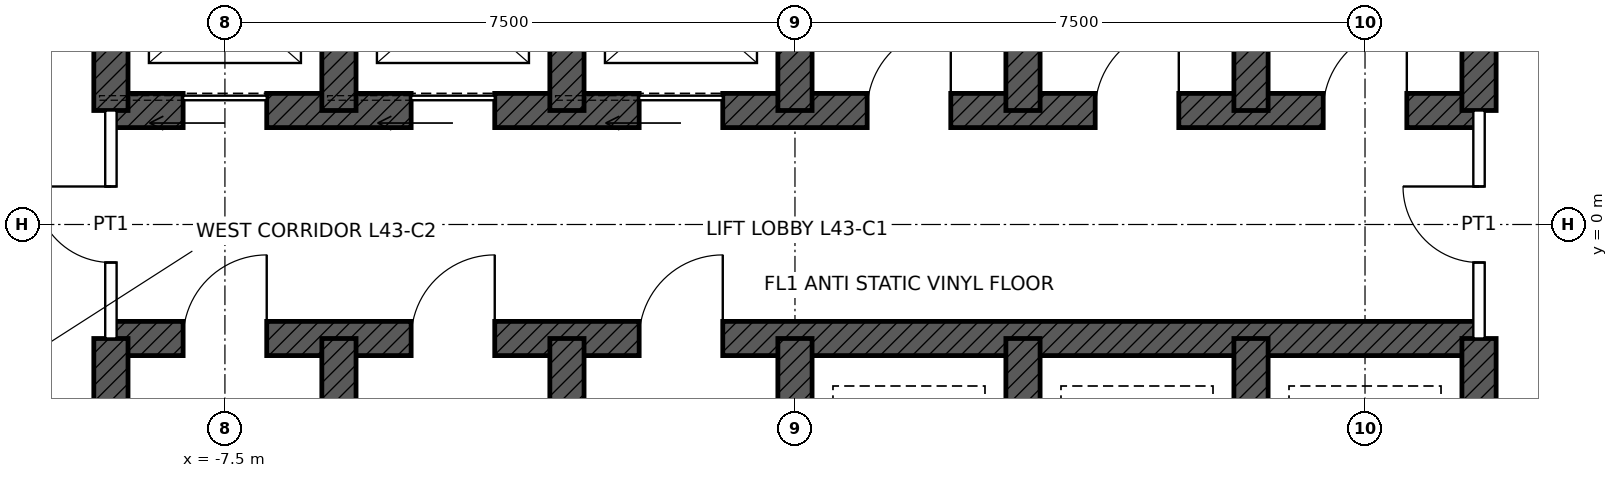
"""IFC4 building model, lengths in metres.
Left out: names, types, materials, properties, quantities, classifications, styles, units other than length and angle.
Written with IfcOpenShell. Run it as: python <this file> out.ifc"""

import sys

from ifc_helpers import new_model, si_unit, direction, frame, frame_2d, origin, place, context, subcontext, project, spatial, rectangle, extrude, element, fill, save


model = new_model("IFC4")
c1 = context("Model", 3, precision=1e-05, world=origin(), true_north=direction((0.0, 1.0)))
c2 = subcontext(c1, "Body", "Model", "MODEL_VIEW")
j1 = project(units=[si_unit("LENGTHUNIT", "METRE"), si_unit("PLANEANGLEUNIT", "RADIAN")], contexts=[c1])
p1 = place(None, origin())
s1 = spatial("IfcSite", under=j1, at=p1, CompositionType="ELEMENT")
p2 = place(p1, origin())
s2 = spatial("IfcBuilding", under=s1, at=p2, CompositionType="ELEMENT")
p3 = place(p2, frame((0.0, 0.0, 205.9)))
s3 = spatial("IfcBuildingStorey", under=s2, at=p3, CompositionType="ELEMENT", Elevation=205.9)
p4 = place(p3, frame((-9.0, 1.5, 0.0), z_axis=(0.0, 0.0, 1.0), x_axis=(1.0, 0.0, 0.0)))
e1 = element("IfcWall", 1, at=p4, inside=s3, PredefinedType="SHEAR", context=c2, shape_type="SweptSolid", body=[
    extrude(rectangle(XDim=18.0, YDim=0.45, at=frame_2d((9.0, 0.0))), origin(), (0.0, 0.0, 1.0), 4.0),
])
p5 = place(p4, frame((0.95, 0.0, 0.0)))
e2 = element("IfcOpeningElement", 2, at=p5, cuts=e1, PredefinedType="OPENING", context=c2, shape_type="SweptSolid", body=[
    extrude(rectangle(XDim=1.1, YDim=2.1, at=frame_2d((0.55, 1.05))), frame((0.0, 0.235, 0.0), z_axis=(0.0, -1.0, 0.0), x_axis=(1.0, 0.0, 0.0)), (0.0, 0.0, 1.0), 0.47),
])
p6 = place(p4, frame((3.95, 0.0, 0.0)))
e3 = element("IfcOpeningElement", 3, at=p6, cuts=e1, PredefinedType="OPENING", context=c2, shape_type="SweptSolid", body=[
    extrude(rectangle(XDim=1.1, YDim=2.1, at=frame_2d((0.55, 1.05))), frame((0.0, 0.235, 0.0), z_axis=(0.0, -1.0, 0.0), x_axis=(1.0, 0.0, 0.0)), (0.0, 0.0, 1.0), 0.47),
])
p7 = place(p4, frame((6.95, 0.0, 0.0)))
e4 = element("IfcOpeningElement", 4, at=p7, cuts=e1, PredefinedType="OPENING", context=c2, shape_type="SweptSolid", body=[
    extrude(rectangle(XDim=1.1, YDim=2.1, at=frame_2d((0.55, 1.05))), frame((0.0, 0.235, 0.0), z_axis=(0.0, -1.0, 0.0), x_axis=(1.0, 0.0, 0.0)), (0.0, 0.0, 1.0), 0.47),
])
p8 = place(p4, frame((9.95, 0.0, 0.0)))
e5 = element("IfcOpeningElement", 5, at=p8, cuts=e1, PredefinedType="OPENING", context=c2, shape_type="SweptSolid", body=[
    extrude(rectangle(XDim=1.1, YDim=2.1, at=frame_2d((0.55, 1.05))), frame((0.0, 0.235, 0.0), z_axis=(0.0, -1.0, 0.0), x_axis=(1.0, 0.0, 0.0)), (0.0, 0.0, 1.0), 0.47),
])
p9 = place(p4, frame((12.95, 0.0, 0.0)))
e6 = element("IfcOpeningElement", 6, at=p9, cuts=e1, PredefinedType="OPENING", context=c2, shape_type="SweptSolid", body=[
    extrude(rectangle(XDim=1.1, YDim=2.1, at=frame_2d((0.55, 1.05))), frame((0.0, 0.235, 0.0), z_axis=(0.0, -1.0, 0.0), x_axis=(1.0, 0.0, 0.0)), (0.0, 0.0, 1.0), 0.47),
])
p10 = place(p4, frame((15.95, 0.0, 0.0)))
e7 = element("IfcOpeningElement", 7, at=p10, cuts=e1, PredefinedType="OPENING", context=c2, shape_type="SweptSolid", body=[
    extrude(rectangle(XDim=1.1, YDim=2.1, at=frame_2d((0.55, 1.05))), frame((0.0, 0.235, 0.0), z_axis=(0.0, -1.0, 0.0), x_axis=(1.0, 0.0, 0.0)), (0.0, 0.0, 1.0), 0.47),
])
p11 = place(p3, frame((-9.0, -1.5, 0.0), z_axis=(0.0, 0.0, 1.0), x_axis=(1.0, 0.0, 0.0)))
e8 = element("IfcWall", 8, at=p11, inside=s3, PredefinedType="SHEAR", context=c2, shape_type="SweptSolid", body=[
    extrude(rectangle(XDim=18.0, YDim=0.45, at=frame_2d((9.0, 0.0))), origin(), (0.0, 0.0, 1.0), 4.0),
])
p12 = place(p11, frame((0.95, 0.0, 0.0)))
e9 = element("IfcOpeningElement", 9, at=p12, cuts=e8, PredefinedType="OPENING", context=c2, shape_type="SweptSolid", body=[
    extrude(rectangle(XDim=1.1, YDim=2.1, at=frame_2d((0.55, 1.05))), frame((0.0, 0.235, 0.0), z_axis=(0.0, -1.0, 0.0), x_axis=(1.0, 0.0, 0.0)), (0.0, 0.0, 1.0), 0.47),
])
p13 = place(p11, frame((3.95, 0.0, 0.0)))
e10 = element("IfcOpeningElement", 10, at=p13, cuts=e8, PredefinedType="OPENING", context=c2, shape_type="SweptSolid", body=[
    extrude(rectangle(XDim=1.1, YDim=2.1, at=frame_2d((0.55, 1.05))), frame((0.0, 0.235, 0.0), z_axis=(0.0, -1.0, 0.0), x_axis=(1.0, 0.0, 0.0)), (0.0, 0.0, 1.0), 0.47),
])
p14 = place(p11, frame((6.95, 0.0, 0.0)))
e11 = element("IfcOpeningElement", 11, at=p14, cuts=e8, PredefinedType="OPENING", context=c2, shape_type="SweptSolid", body=[
    extrude(rectangle(XDim=1.1, YDim=2.1, at=frame_2d((0.55, 1.05))), frame((0.0, 0.235, 0.0), z_axis=(0.0, -1.0, 0.0), x_axis=(1.0, 0.0, 0.0)), (0.0, 0.0, 1.0), 0.47),
])
for number, where, z_axis, x_axis in (
    (12, (-9.0, 1.5, 0.0), (0.0, 0.0, 1.0), (0.0, 1.0, 0.0)),
    (13, (9.0, 1.5, 0.0), (0.0, 0.0, 1.0), (0.0, 1.0, 0.0)),
    (14, (-9.0, -4.5, 0.0), (0.0, 0.0, 1.0), (0.0, 1.0, 0.0)),
    (15, (9.0, -4.5, 0.0), (0.0, 0.0, 1.0), (0.0, 1.0, 0.0)),
    (16, (-6.0, 1.5, 0.0), (0.0, 0.0, 1.0), (0.0, 1.0, 0.0)),
    (17, (-3.0, 1.5, 0.0), (0.0, 0.0, 1.0), (0.0, 1.0, 0.0)),
    (18, (0.0, 1.5, 0.0), (0.0, 0.0, 1.0), (0.0, 1.0, 0.0)),
    (19, (3.0, 1.5, 0.0), (0.0, 0.0, 1.0), (0.0, 1.0, 0.0)),
    (20, (6.0, 1.5, 0.0), (0.0, 0.0, 1.0), (0.0, 1.0, 0.0)),
    (21, (-6.0, -4.5, 0.0), (0.0, 0.0, 1.0), (0.0, 1.0, 0.0)),
    (22, (-3.0, -4.5, 0.0), (0.0, 0.0, 1.0), (0.0, 1.0, 0.0)),
    (23, (0.0, -4.5, 0.0), (0.0, 0.0, 1.0), (0.0, 1.0, 0.0)),
    (24, (3.0, -4.5, 0.0), (0.0, 0.0, 1.0), (0.0, 1.0, 0.0)),
    (25, (6.0, -4.5, 0.0), (0.0, 0.0, 1.0), (0.0, 1.0, 0.0)),
):
    element("IfcWall", number, at=place(p3, frame(where, z_axis=z_axis, x_axis=x_axis)), inside=s3, PredefinedType="SHEAR", context=c2, shape_type="SweptSolid", body=[
        extrude(rectangle(XDim=3.0, YDim=0.45, at=frame_2d((1.5, 0.0))), origin(), (0.0, 0.0, 1.0), 4.0),
    ])
p15 = place(p3, frame((-9.0, -1.5, 0.0), z_axis=(0.0, 0.0, 1.0), x_axis=(0.0, 1.0, 0.0)))
e26 = element("IfcWall", 26, at=p15, inside=s3, PredefinedType="PARTITIONING", context=c2, shape_type="SweptSolid", body=[
    extrude(rectangle(XDim=3.0, YDim=0.15, at=frame_2d((1.5, 0.0))), origin(), (0.0, 0.0, 1.0), 3.75),
])
p16 = place(p15, frame((1.0, 0.0, 0.0)))
e27 = element("IfcOpeningElement", 27, at=p16, cuts=e26, PredefinedType="OPENING", context=c2, shape_type="SweptSolid", body=[
    extrude(rectangle(XDim=1.0, YDim=2.4, at=frame_2d((0.5, 1.2))), frame((0.0, 0.085, 0.0), z_axis=(0.0, -1.0, 0.0), x_axis=(1.0, 0.0, 0.0)), (0.0, 0.0, 1.0), 0.17),
])
p17 = place(p3, frame((9.0, -1.5, 0.0), z_axis=(0.0, 0.0, 1.0), x_axis=(0.0, 1.0, 0.0)))
e28 = element("IfcWall", 28, at=p17, inside=s3, PredefinedType="PARTITIONING", context=c2, shape_type="SweptSolid", body=[
    extrude(rectangle(XDim=3.0, YDim=0.15, at=frame_2d((1.5, 0.0))), origin(), (0.0, 0.0, 1.0), 3.75),
])
p18 = place(p17, frame((1.0, 0.0, 0.0)))
e29 = element("IfcOpeningElement", 29, at=p18, cuts=e28, PredefinedType="OPENING", context=c2, shape_type="SweptSolid", body=[
    extrude(rectangle(XDim=1.0, YDim=2.4, at=frame_2d((0.5, 1.2))), frame((0.0, 0.085, 0.0), z_axis=(0.0, -1.0, 0.0), x_axis=(1.0, 0.0, 0.0)), (0.0, 0.0, 1.0), 0.17),
])
p19 = place(p5, origin())
e30 = element("IfcDoor", 30, at=p19, inside=s3, OperationType="SLIDING_TO_LEFT", PredefinedType="DOOR", context=c2, shape_type="SweptSolid", body=[
    extrude(rectangle(XDim=1.1, YDim=2.1, at=frame_2d((0.55, 1.05))), frame((0.0, 0.025, 0.0), z_axis=(0.0, -1.0, 0.0), x_axis=(1.0, 0.0, 0.0)), (0.0, 0.0, 1.0), 0.05),
])
fill(e2, e30)
p20 = place(p6, origin())
e31 = element("IfcDoor", 31, at=p20, inside=s3, OperationType="SLIDING_TO_LEFT", PredefinedType="DOOR", context=c2, shape_type="SweptSolid", body=[
    extrude(rectangle(XDim=1.1, YDim=2.1, at=frame_2d((0.55, 1.05))), frame((0.0, 0.025, 0.0), z_axis=(0.0, -1.0, 0.0), x_axis=(1.0, 0.0, 0.0)), (0.0, 0.0, 1.0), 0.05),
])
fill(e3, e31)
p21 = place(p7, origin())
e32 = element("IfcDoor", 32, at=p21, inside=s3, OperationType="SLIDING_TO_LEFT", PredefinedType="DOOR", context=c2, shape_type="SweptSolid", body=[
    extrude(rectangle(XDim=1.1, YDim=2.1, at=frame_2d((0.55, 1.05))), frame((0.0, 0.025, 0.0), z_axis=(0.0, -1.0, 0.0), x_axis=(1.0, 0.0, 0.0)), (0.0, 0.0, 1.0), 0.05),
])
fill(e4, e32)
p22 = place(p16, origin())
e33 = element("IfcDoor", 33, at=p22, inside=s3, OperationType="SINGLE_SWING_RIGHT", PredefinedType="DOOR", context=c2, shape_type="SweptSolid", body=[
    extrude(rectangle(XDim=1.0, YDim=2.4, at=frame_2d((0.5, 1.2))), frame((0.0, 0.025, 0.0), z_axis=(0.0, -1.0, 0.0), x_axis=(1.0, 0.0, 0.0)), (0.0, 0.0, 1.0), 0.05),
])
fill(e27, e33)
p23 = place(p18, origin())
e34 = element("IfcDoor", 34, at=p23, inside=s3, OperationType="SINGLE_SWING_RIGHT", PredefinedType="DOOR", context=c2, shape_type="SweptSolid", body=[
    extrude(rectangle(XDim=1.0, YDim=2.4, at=frame_2d((0.5, 1.2))), frame((0.0, 0.025, 0.0), z_axis=(0.0, -1.0, 0.0), x_axis=(1.0, 0.0, 0.0)), (0.0, 0.0, 1.0), 0.05),
])
fill(e29, e34)
p24 = place(p8, origin())
e35 = element("IfcDoor", 35, at=p24, inside=s3, OperationType="SINGLE_SWING_RIGHT", PredefinedType="DOOR", context=c2, shape_type="SweptSolid", body=[
    extrude(rectangle(XDim=1.1, YDim=2.1, at=frame_2d((0.55, 1.05))), frame((0.0, 0.025, 0.0), z_axis=(0.0, -1.0, 0.0), x_axis=(1.0, 0.0, 0.0)), (0.0, 0.0, 1.0), 0.05),
])
fill(e5, e35)
p25 = place(p9, origin())
e36 = element("IfcDoor", 36, at=p25, inside=s3, OperationType="SINGLE_SWING_RIGHT", PredefinedType="DOOR", context=c2, shape_type="SweptSolid", body=[
    extrude(rectangle(XDim=1.1, YDim=2.1, at=frame_2d((0.55, 1.05))), frame((0.0, 0.025, 0.0), z_axis=(0.0, -1.0, 0.0), x_axis=(1.0, 0.0, 0.0)), (0.0, 0.0, 1.0), 0.05),
])
fill(e6, e36)
p26 = place(p10, origin())
e37 = element("IfcDoor", 37, at=p26, inside=s3, OperationType="SINGLE_SWING_RIGHT", PredefinedType="DOOR", context=c2, shape_type="SweptSolid", body=[
    extrude(rectangle(XDim=1.1, YDim=2.1, at=frame_2d((0.55, 1.05))), frame((0.0, 0.025, 0.0), z_axis=(0.0, -1.0, 0.0), x_axis=(1.0, 0.0, 0.0)), (0.0, 0.0, 1.0), 0.05),
])
fill(e7, e37)
p27 = place(p12, origin())
e38 = element("IfcDoor", 38, at=p27, inside=s3, OperationType="SINGLE_SWING_RIGHT", PredefinedType="DOOR", context=c2, shape_type="SweptSolid", body=[
    extrude(rectangle(XDim=1.1, YDim=2.1, at=frame_2d((0.55, 1.05))), frame((0.0, 0.025, 0.0), z_axis=(0.0, -1.0, 0.0), x_axis=(1.0, 0.0, 0.0)), (0.0, 0.0, 1.0), 0.05),
])
fill(e9, e38)
p28 = place(p13, origin())
e39 = element("IfcDoor", 39, at=p28, inside=s3, OperationType="SINGLE_SWING_RIGHT", PredefinedType="DOOR", context=c2, shape_type="SweptSolid", body=[
    extrude(rectangle(XDim=1.1, YDim=2.1, at=frame_2d((0.55, 1.05))), frame((0.0, 0.025, 0.0), z_axis=(0.0, -1.0, 0.0), x_axis=(1.0, 0.0, 0.0)), (0.0, 0.0, 1.0), 0.05),
])
fill(e10, e39)
p29 = place(p14, origin())
e40 = element("IfcDoor", 40, at=p29, inside=s3, OperationType="SINGLE_SWING_RIGHT", PredefinedType="DOOR", context=c2, shape_type="SweptSolid", body=[
    extrude(rectangle(XDim=1.1, YDim=2.1, at=frame_2d((0.55, 1.05))), frame((0.0, 0.025, 0.0), z_axis=(0.0, -1.0, 0.0), x_axis=(1.0, 0.0, 0.0)), (0.0, 0.0, 1.0), 0.05),
])
fill(e11, e40)
save(model, sys.argv[1])
